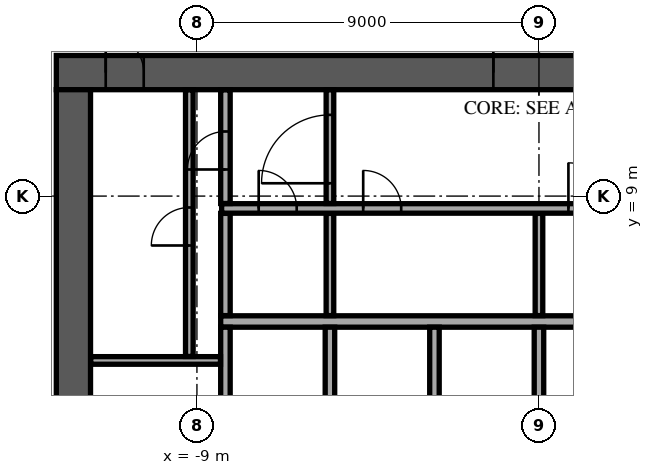
"""IFC4 building model, lengths in metres.
Left out: names, types, materials, properties, quantities, classifications, styles, units other than length and angle.
Written with IfcOpenShell. Run it as: python <this file> out.ifc"""

import sys

from ifc_helpers import new_model, si_unit, direction, frame, frame_2d, origin, place, context, subcontext, project, spatial, rectangle, extrude, element, fill, save


model = new_model("IFC4")
c1 = context("Model", 3, precision=1e-05, world=origin(), true_north=direction((0.0, 1.0)))
c2 = subcontext(c1, "Body", "Model", "MODEL_VIEW")
j1 = project(units=[si_unit("LENGTHUNIT", "METRE"), si_unit("PLANEANGLEUNIT", "RADIAN")], contexts=[c1])
p1 = place(None, origin())
s1 = spatial("IfcSite", under=j1, at=p1, CompositionType="ELEMENT")
p2 = place(p1, origin())
s2 = spatial("IfcBuilding", under=s1, at=p2, CompositionType="ELEMENT")
p3 = place(p2, frame((0.0, 0.0, 205.3)))
s3 = spatial("IfcBuildingStorey", under=s2, at=p3, CompositionType="ELEMENT", Elevation=205.3)
p4 = place(p3, frame((-12.7, 12.25, 0.0), z_axis=(0.0, 0.0, 1.0), x_axis=(1.0, 0.0, 0.0)))
e1 = element("IfcWall", 1, at=p4, inside=s3, PredefinedType="SHEAR", context=c2, shape_type="SweptSolid", body=[
    extrude(rectangle(XDim=25.4, YDim=0.9, at=frame_2d((12.7, 0.0))), origin(), (0.0, 0.0, 1.0), 3.62),
])
p5 = place(p4, frame((11.5, 0.0, 0.0)))
e2 = element("IfcOpeningElement", 2, at=p5, cuts=e1, PredefinedType="OPENING", context=c2, shape_type="SweptSolid", body=[
    extrude(rectangle(XDim=2.4, YDim=2.4, at=frame_2d((1.2, 1.2))), frame((0.0, 0.46, 0.0), z_axis=(0.0, -1.0, 0.0), x_axis=(1.0, 0.0, 0.0)), (0.0, 0.0, 1.0), 0.92),
])
p6 = place(p4, frame((22.325, 0.0, 0.0)))
e3 = element("IfcOpeningElement", 3, at=p6, cuts=e1, PredefinedType="OPENING", context=c2, shape_type="SweptSolid", body=[
    extrude(rectangle(XDim=1.2, YDim=2.1, at=frame_2d((0.6, 1.05))), frame((0.0, 0.46, 0.0), z_axis=(0.0, -1.0, 0.0), x_axis=(1.0, 0.0, 0.0)), (0.0, 0.0, 1.0), 0.92),
])
p7 = place(p4, frame((1.3, 0.0, 0.0)))
e4 = element("IfcOpeningElement", 4, at=p7, cuts=e1, PredefinedType="OPENING", context=c2, shape_type="SweptSolid", body=[
    extrude(rectangle(XDim=1.0, YDim=2.1, at=frame_2d((0.5, 1.05))), frame((0.0, 0.46, 0.0), z_axis=(0.0, -1.0, 0.0), x_axis=(1.0, 0.0, 0.0)), (0.0, 0.0, 1.0), 0.92),
])
p8 = place(p3, frame((-12.25, -11.8, 0.0), z_axis=(0.0, 0.0, 1.0), x_axis=(0.0, 1.0, 0.0)))
e5 = element("IfcWall", 5, at=p8, inside=s3, PredefinedType="SHEAR", context=c2, shape_type="SweptSolid", body=[
    extrude(rectangle(XDim=23.6, YDim=0.9, at=frame_2d((11.8, 0.0))), origin(), (0.0, 0.0, 1.0), 3.62),
])
p9 = place(p8, frame((10.6, 0.0, 0.0)))
e6 = element("IfcOpeningElement", 6, at=p9, cuts=e5, PredefinedType="OPENING", context=c2, shape_type="SweptSolid", body=[
    extrude(rectangle(XDim=2.4, YDim=2.4, at=frame_2d((1.2, 1.2))), frame((0.0, 0.46, 0.0), z_axis=(0.0, -1.0, 0.0), x_axis=(1.0, 0.0, 0.0)), (0.0, 0.0, 1.0), 0.92),
])
p10 = place(p3, frame((-8.375, 5.7, 0.0), z_axis=(0.0, 0.0, 1.0), x_axis=(1.0, 0.0, 0.0)))
e7 = element("IfcWall", 7, at=p10, inside=s3, PredefinedType="SOLIDWALL", context=c2, shape_type="SweptSolid", body=[
    extrude(rectangle(XDim=16.75, YDim=0.3, at=frame_2d((8.375, 0.0))), origin(), (0.0, 0.0, 1.0), 3.62),
])
for number, where, z_axis, x_axis in (
    (8, (-8.25, 2.85, 0.0), (0.0, 0.0, 1.0), (0.0, 1.0, 0.0)),
    (9, (-5.5, 2.85, 0.0), (0.0, 0.0, 1.0), (0.0, 1.0, 0.0)),
    (10, (-2.75, 2.85, 0.0), (0.0, 0.0, 1.0), (0.0, 1.0, 0.0)),
    (11, (0.0, 2.85, 0.0), (0.0, 0.0, 1.0), (0.0, 1.0, 0.0)),
):
    element("IfcWall", number, at=place(p3, frame(where, z_axis=z_axis, x_axis=x_axis)), inside=s3, PredefinedType="SOLIDWALL", context=c2, shape_type="SweptSolid", body=[
        extrude(rectangle(XDim=2.7, YDim=0.25, at=frame_2d((1.35, 0.0))), origin(), (0.0, 0.0, 1.0), 3.62),
    ])
p11 = place(p3, frame((-11.795, 4.675, 0.0), z_axis=(0.0, 0.0, 1.0), x_axis=(1.0, 0.0, 0.0)))
e12 = element("IfcWall", 12, at=p11, inside=s3, PredefinedType="PARTITIONING", context=c2, shape_type="SweptSolid", body=[
    extrude(rectangle(XDim=3.415, YDim=0.2, at=frame_2d((1.708, 0.0))), origin(), (0.0, 0.0, 1.0), 3.62),
])
p12 = place(p3, frame((-9.2, 4.78, 0.0), z_axis=(0.0, 0.0, 1.0), x_axis=(0.0, 1.0, 0.0)))
e13 = element("IfcWall", 13, at=p12, inside=s3, PredefinedType="PARTITIONING", context=c2, shape_type="SweptSolid", body=[
    extrude(rectangle(XDim=7.015, YDim=0.2, at=frame_2d((3.507, 0.0))), origin(), (0.0, 0.0, 1.0), 3.62),
])
p13 = place(p12, frame((2.92, 0.0, 0.0)))
e14 = element("IfcOpeningElement", 14, at=p13, cuts=e13, PredefinedType="OPENING", context=c2, shape_type="SweptSolid", body=[
    extrude(rectangle(XDim=1.0, YDim=2.1, at=frame_2d((0.5, 1.05))), frame((0.0, 0.11, 0.0), z_axis=(0.0, -1.0, 0.0), x_axis=(1.0, 0.0, 0.0)), (0.0, 0.0, 1.0), 0.22),
])
p14 = place(p3, frame((-8.25, 5.855, 0.0), z_axis=(0.0, 0.0, 1.0), x_axis=(0.0, 1.0, 0.0)))
e15 = element("IfcWall", 15, at=p14, inside=s3, PredefinedType="PARTITIONING", context=c2, shape_type="SweptSolid", body=[
    extrude(rectangle(XDim=2.69, YDim=0.25, at=frame_2d((1.345, 0.0))), origin(), (0.0, 0.0, 1.0), 3.62),
])
for number, where, z_axis, x_axis in (
    (16, (-5.5, 5.855, 0.0), (0.0, 0.0, 1.0), (0.0, 1.0, 0.0)),
    (17, (0.0, 5.855, 0.0), (0.0, 0.0, 1.0), (0.0, 1.0, 0.0)),
):
    element("IfcWall", number, at=place(p3, frame(where, z_axis=z_axis, x_axis=x_axis)), inside=s3, PredefinedType="PARTITIONING", context=c2, shape_type="SweptSolid", body=[
        extrude(rectangle(XDim=2.69, YDim=0.2, at=frame_2d((1.345, 0.0))), origin(), (0.0, 0.0, 1.0), 3.62),
    ])
p15 = place(p3, frame((-8.35, 8.675, 0.0), z_axis=(0.0, 0.0, 1.0), x_axis=(1.0, 0.0, 0.0)))
e18 = element("IfcWall", 18, at=p15, inside=s3, PredefinedType="PARTITIONING", context=c2, shape_type="SweptSolid", body=[
    extrude(rectangle(XDim=16.72, YDim=0.25, at=frame_2d((8.36, 0.0))), origin(), (0.0, 0.0, 1.0), 3.62),
])
p16 = place(p15, frame((0.975, 0.0, 0.0)))
e19 = element("IfcOpeningElement", 19, at=p16, cuts=e18, PredefinedType="OPENING", context=c2, shape_type="SweptSolid", body=[
    extrude(rectangle(XDim=1.0, YDim=2.1, at=frame_2d((0.5, 1.05))), frame((0.0, 0.135, 0.0), z_axis=(0.0, -1.0, 0.0), x_axis=(1.0, 0.0, 0.0)), (0.0, 0.0, 1.0), 0.27),
])
p17 = place(p15, frame((3.725, 0.0, 0.0)))
e20 = element("IfcOpeningElement", 20, at=p17, cuts=e18, PredefinedType="OPENING", context=c2, shape_type="SweptSolid", body=[
    extrude(rectangle(XDim=1.0, YDim=2.1, at=frame_2d((0.5, 1.05))), frame((0.0, 0.135, 0.0), z_axis=(0.0, -1.0, 0.0), x_axis=(1.0, 0.0, 0.0)), (0.0, 0.0, 1.0), 0.27),
])
p18 = place(p15, frame((9.125, 0.0, 0.0)))
e21 = element("IfcOpeningElement", 21, at=p18, cuts=e18, PredefinedType="OPENING", context=c2, shape_type="SweptSolid", body=[
    extrude(rectangle(XDim=1.2, YDim=2.1, at=frame_2d((0.6, 1.05))), frame((0.0, 0.135, 0.0), z_axis=(0.0, -1.0, 0.0), x_axis=(1.0, 0.0, 0.0)), (0.0, 0.0, 1.0), 0.27),
])
p19 = place(p3, frame((-8.25, 8.805, 0.0), z_axis=(0.0, 0.0, 1.0), x_axis=(0.0, 1.0, 0.0)))
e22 = element("IfcWall", 22, at=p19, inside=s3, PredefinedType="PARTITIONING", context=c2, shape_type="SweptSolid", body=[
    extrude(rectangle(XDim=2.99, YDim=0.25, at=frame_2d((1.495, 0.0))), origin(), (0.0, 0.0, 1.0), 3.62),
])
p20 = place(p19, frame((0.895, 0.0, 0.0)))
e23 = element("IfcOpeningElement", 23, at=p20, cuts=e22, PredefinedType="OPENING", context=c2, shape_type="SweptSolid", body=[
    extrude(rectangle(XDim=1.0, YDim=2.1, at=frame_2d((0.5, 1.05))), frame((0.0, 0.135, 0.0), z_axis=(0.0, -1.0, 0.0), x_axis=(1.0, 0.0, 0.0)), (0.0, 0.0, 1.0), 0.27),
])
p21 = place(p3, frame((-5.5, 8.805, 0.0), z_axis=(0.0, 0.0, 1.0), x_axis=(0.0, 1.0, 0.0)))
e24 = element("IfcWall", 24, at=p21, inside=s3, PredefinedType="PARTITIONING", context=c2, shape_type="SweptSolid", body=[
    extrude(rectangle(XDim=2.99, YDim=0.2, at=frame_2d((1.495, 0.0))), origin(), (0.0, 0.0, 1.0), 3.62),
])
p22 = place(p21, frame((0.532, 0.0, 0.0)))
e25 = element("IfcOpeningElement", 25, at=p22, cuts=e24, PredefinedType="OPENING", context=c2, shape_type="SweptSolid", body=[
    extrude(rectangle(XDim=1.8, YDim=2.1, at=frame_2d((0.9, 1.05))), frame((0.0, 0.11, 0.0), z_axis=(0.0, -1.0, 0.0), x_axis=(1.0, 0.0, 0.0)), (0.0, 0.0, 1.0), 0.22),
])
p23 = place(p3, frame((-0.749, 34.782, 0.0), z_axis=(0.0, 0.0, 1.0), x_axis=(-0.694657553534, -0.719340589233, 0.0)))
e26 = element("IfcWall", 26, at=p23, inside=s3, PredefinedType="STANDARD", context=c2, shape_type="SweptSolid", body=[
    extrude(rectangle(XDim=49.0, YDim=0.6, at=frame_2d((24.5, 0.0))), origin(), (0.0, 0.0, 1.0), 3.62),
])
p24 = place(p23, frame((1.227, 0.0, 0.9)))
e27 = element("IfcOpeningElement", 27, at=p24, cuts=e26, PredefinedType="OPENING", context=c2, shape_type="SweptSolid", body=[
    extrude(rectangle(XDim=2.0, YDim=2.1, at=frame_2d((1.0, 1.05))), frame((0.0, 0.31, 0.0), z_axis=(0.0, -1.0, 0.0), x_axis=(1.0, 0.0, 0.0)), (0.0, 0.0, 1.0), 0.62),
])
p25 = place(p23, frame((5.682, 0.0, 0.9)))
e28 = element("IfcOpeningElement", 28, at=p25, cuts=e26, PredefinedType="OPENING", context=c2, shape_type="SweptSolid", body=[
    extrude(rectangle(XDim=2.0, YDim=2.1, at=frame_2d((1.0, 1.05))), frame((0.0, 0.31, 0.0), z_axis=(0.0, -1.0, 0.0), x_axis=(1.0, 0.0, 0.0)), (0.0, 0.0, 1.0), 0.62),
])
p26 = place(p23, frame((10.136, 0.0, 0.9)))
e29 = element("IfcOpeningElement", 29, at=p26, cuts=e26, PredefinedType="OPENING", context=c2, shape_type="SweptSolid", body=[
    extrude(rectangle(XDim=2.0, YDim=2.1, at=frame_2d((1.0, 1.05))), frame((0.0, 0.31, 0.0), z_axis=(0.0, -1.0, 0.0), x_axis=(1.0, 0.0, 0.0)), (0.0, 0.0, 1.0), 0.62),
])
p27 = place(p23, frame((14.591, 0.0, 0.9)))
e30 = element("IfcOpeningElement", 30, at=p27, cuts=e26, PredefinedType="OPENING", context=c2, shape_type="SweptSolid", body=[
    extrude(rectangle(XDim=2.0, YDim=2.1, at=frame_2d((1.0, 1.05))), frame((0.0, 0.31, 0.0), z_axis=(0.0, -1.0, 0.0), x_axis=(1.0, 0.0, 0.0)), (0.0, 0.0, 1.0), 0.62),
])
p28 = place(p23, frame((19.045, 0.0, 0.9)))
e31 = element("IfcOpeningElement", 31, at=p28, cuts=e26, PredefinedType="OPENING", context=c2, shape_type="SweptSolid", body=[
    extrude(rectangle(XDim=2.0, YDim=2.1, at=frame_2d((1.0, 1.05))), frame((0.0, 0.31, 0.0), z_axis=(0.0, -1.0, 0.0), x_axis=(1.0, 0.0, 0.0)), (0.0, 0.0, 1.0), 0.62),
])
p29 = place(p23, frame((23.5, 0.0, 0.9)))
e32 = element("IfcOpeningElement", 32, at=p29, cuts=e26, PredefinedType="OPENING", context=c2, shape_type="SweptSolid", body=[
    extrude(rectangle(XDim=2.0, YDim=2.1, at=frame_2d((1.0, 1.05))), frame((0.0, 0.31, 0.0), z_axis=(0.0, -1.0, 0.0), x_axis=(1.0, 0.0, 0.0)), (0.0, 0.0, 1.0), 0.62),
])
p30 = place(p23, frame((27.955, 0.0, 0.9)))
e33 = element("IfcOpeningElement", 33, at=p30, cuts=e26, PredefinedType="OPENING", context=c2, shape_type="SweptSolid", body=[
    extrude(rectangle(XDim=2.0, YDim=2.1, at=frame_2d((1.0, 1.05))), frame((0.0, 0.31, 0.0), z_axis=(0.0, -1.0, 0.0), x_axis=(1.0, 0.0, 0.0)), (0.0, 0.0, 1.0), 0.62),
])
p31 = place(p23, frame((32.409, 0.0, 0.9)))
e34 = element("IfcOpeningElement", 34, at=p31, cuts=e26, PredefinedType="OPENING", context=c2, shape_type="SweptSolid", body=[
    extrude(rectangle(XDim=2.0, YDim=2.1, at=frame_2d((1.0, 1.05))), frame((0.0, 0.31, 0.0), z_axis=(0.0, -1.0, 0.0), x_axis=(1.0, 0.0, 0.0)), (0.0, 0.0, 1.0), 0.62),
])
p32 = place(p23, frame((36.864, 0.0, 0.9)))
e35 = element("IfcOpeningElement", 35, at=p32, cuts=e26, PredefinedType="OPENING", context=c2, shape_type="SweptSolid", body=[
    extrude(rectangle(XDim=2.0, YDim=2.1, at=frame_2d((1.0, 1.05))), frame((0.0, 0.31, 0.0), z_axis=(0.0, -1.0, 0.0), x_axis=(1.0, 0.0, 0.0)), (0.0, 0.0, 1.0), 0.62),
])
p33 = place(p23, frame((41.318, 0.0, 0.9)))
e36 = element("IfcOpeningElement", 36, at=p33, cuts=e26, PredefinedType="OPENING", context=c2, shape_type="SweptSolid", body=[
    extrude(rectangle(XDim=2.0, YDim=2.1, at=frame_2d((1.0, 1.05))), frame((0.0, 0.31, 0.0), z_axis=(0.0, -1.0, 0.0), x_axis=(1.0, 0.0, 0.0)), (0.0, 0.0, 1.0), 0.62),
])
p34 = place(p23, frame((45.773, 0.0, 0.9)))
e37 = element("IfcOpeningElement", 37, at=p34, cuts=e26, PredefinedType="OPENING", context=c2, shape_type="SweptSolid", body=[
    extrude(rectangle(XDim=2.0, YDim=2.1, at=frame_2d((1.0, 1.05))), frame((0.0, 0.31, 0.0), z_axis=(0.0, -1.0, 0.0), x_axis=(1.0, 0.0, 0.0)), (0.0, 0.0, 1.0), 0.62),
])
p35 = place(p3, frame((-26.96, -0.016, 0.0), z_axis=(0.0, 0.0, 1.0), x_axis=(0.694654845656, 0.719343204184, 0.0)))
e38 = element("IfcWall", 38, at=p35, inside=s3, PredefinedType="PARTITIONING", context=c2, shape_type="SweptSolid", body=[
    extrude(rectangle(XDim=37.479, YDim=0.15, at=frame_2d((18.74, 0.0))), origin(), (0.0, 0.0, 1.0), 2.97),
])
p36 = place(p35, frame((4.3, 0.0, 0.0)))
e39 = element("IfcOpeningElement", 39, at=p36, cuts=e38, PredefinedType="OPENING", context=c2, shape_type="SweptSolid", body=[
    extrude(rectangle(XDim=1.8, YDim=2.1, at=frame_2d((0.9, 1.05))), frame((0.0, 0.085, 0.0), z_axis=(0.0, -1.0, 0.0), x_axis=(1.0, 0.0, 0.0)), (0.0, 0.0, 1.0), 0.17),
])
p37 = place(p35, frame((15.547, 0.0, 0.0)))
e40 = element("IfcOpeningElement", 40, at=p37, cuts=e38, PredefinedType="OPENING", context=c2, shape_type="SweptSolid", body=[
    extrude(rectangle(XDim=1.0, YDim=2.1, at=frame_2d((0.5, 1.05))), frame((0.0, 0.085, 0.0), z_axis=(0.0, -1.0, 0.0), x_axis=(1.0, 0.0, 0.0)), (0.0, 0.0, 1.0), 0.17),
])
p38 = place(p35, frame((22.58, 0.0, 0.0)))
e41 = element("IfcOpeningElement", 41, at=p38, cuts=e38, PredefinedType="OPENING", context=c2, shape_type="SweptSolid", body=[
    extrude(rectangle(XDim=1.0, YDim=2.1, at=frame_2d((0.5, 1.05))), frame((0.0, 0.085, 0.0), z_axis=(0.0, -1.0, 0.0), x_axis=(1.0, 0.0, 0.0)), (0.0, 0.0, 1.0), 0.17),
])
p39 = place(p35, frame((35.508, 0.0, 0.0)))
e42 = element("IfcOpeningElement", 42, at=p39, cuts=e38, PredefinedType="OPENING", context=c2, shape_type="SweptSolid", body=[
    extrude(rectangle(XDim=1.0, YDim=2.1, at=frame_2d((0.5, 1.05))), frame((0.0, 0.085, 0.0), z_axis=(0.0, -1.0, 0.0), x_axis=(1.0, 0.0, 0.0)), (0.0, 0.0, 1.0), 0.17),
])
p40 = place(p5, origin())
e43 = element("IfcDoor", 43, at=p40, inside=s3, OperationType="SINGLE_SWING_LEFT", PredefinedType="DOOR", context=c2, shape_type="SweptSolid", body=[
    extrude(rectangle(XDim=2.4, YDim=2.4, at=frame_2d((1.2, 1.2))), frame((0.0, 0.025, 0.0), z_axis=(0.0, -1.0, 0.0), x_axis=(1.0, 0.0, 0.0)), (0.0, 0.0, 1.0), 0.05),
])
fill(e2, e43)
p41 = place(p7, origin())
e44 = element("IfcDoor", 44, at=p41, inside=s3, OperationType="SINGLE_SWING_LEFT", PredefinedType="DOOR", context=c2, shape_type="SweptSolid", body=[
    extrude(rectangle(XDim=1.0, YDim=2.1, at=frame_2d((0.5, 1.05))), frame((0.0, 0.025, 0.0), z_axis=(0.0, -1.0, 0.0), x_axis=(1.0, 0.0, 0.0)), (0.0, 0.0, 1.0), 0.05),
])
fill(e4, e44)
p42 = place(p13, origin())
e45 = element("IfcDoor", 45, at=p42, inside=s3, OperationType="SINGLE_SWING_LEFT", PredefinedType="DOOR", context=c2, shape_type="SweptSolid", body=[
    extrude(rectangle(XDim=1.0, YDim=2.1, at=frame_2d((0.5, 1.05))), frame((0.0, 0.025, 0.0), z_axis=(0.0, -1.0, 0.0), x_axis=(1.0, 0.0, 0.0)), (0.0, 0.0, 1.0), 0.05),
])
fill(e14, e45)
p43 = place(p20, origin())
e46 = element("IfcDoor", 46, at=p43, inside=s3, OperationType="SINGLE_SWING_LEFT", PredefinedType="DOOR", context=c2, shape_type="SweptSolid", body=[
    extrude(rectangle(XDim=1.0, YDim=2.1, at=frame_2d((0.5, 1.05))), frame((0.0, 0.025, 0.0), z_axis=(0.0, -1.0, 0.0), x_axis=(1.0, 0.0, 0.0)), (0.0, 0.0, 1.0), 0.05),
])
fill(e23, e46)
p44 = place(p16, origin())
e47 = element("IfcDoor", 47, at=p44, inside=s3, OperationType="SINGLE_SWING_LEFT", PredefinedType="DOOR", context=c2, shape_type="SweptSolid", body=[
    extrude(rectangle(XDim=1.0, YDim=2.1, at=frame_2d((0.5, 1.05))), frame((0.0, 0.025, 0.0), z_axis=(0.0, -1.0, 0.0), x_axis=(1.0, 0.0, 0.0)), (0.0, 0.0, 1.0), 0.05),
])
fill(e19, e47)
p45 = place(p17, origin())
e48 = element("IfcDoor", 48, at=p45, inside=s3, OperationType="SINGLE_SWING_LEFT", PredefinedType="DOOR", context=c2, shape_type="SweptSolid", body=[
    extrude(rectangle(XDim=1.0, YDim=2.1, at=frame_2d((0.5, 1.05))), frame((0.0, 0.025, 0.0), z_axis=(0.0, -1.0, 0.0), x_axis=(1.0, 0.0, 0.0)), (0.0, 0.0, 1.0), 0.05),
])
fill(e20, e48)
p46 = place(p18, origin())
e49 = element("IfcDoor", 49, at=p46, inside=s3, OperationType="SINGLE_SWING_LEFT", PredefinedType="DOOR", context=c2, shape_type="SweptSolid", body=[
    extrude(rectangle(XDim=1.2, YDim=2.1, at=frame_2d((0.6, 1.05))), frame((0.0, 0.025, 0.0), z_axis=(0.0, -1.0, 0.0), x_axis=(1.0, 0.0, 0.0)), (0.0, 0.0, 1.0), 0.05),
])
fill(e21, e49)
p47 = place(p22, origin())
e50 = element("IfcDoor", 50, at=p47, inside=s3, OperationType="SINGLE_SWING_LEFT", PredefinedType="DOOR", context=c2, shape_type="SweptSolid", body=[
    extrude(rectangle(XDim=1.8, YDim=2.1, at=frame_2d((0.9, 1.05))), frame((0.0, 0.025, 0.0), z_axis=(0.0, -1.0, 0.0), x_axis=(1.0, 0.0, 0.0)), (0.0, 0.0, 1.0), 0.05),
])
fill(e25, e50)
save(model, sys.argv[1])
